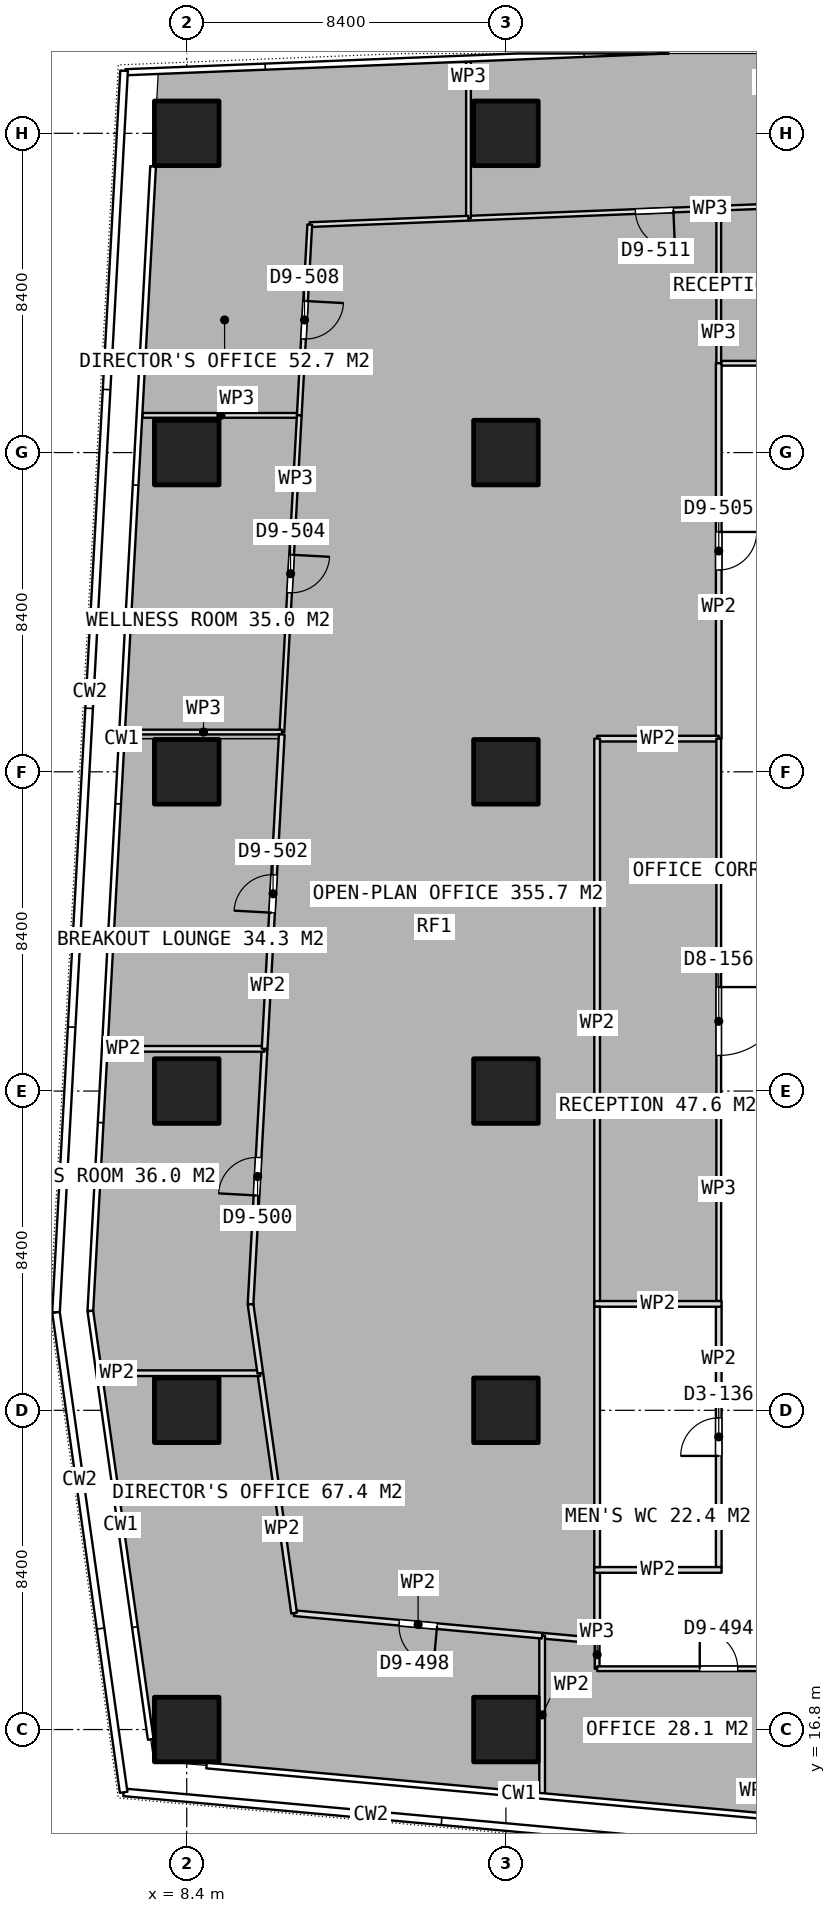
"""IFC4 building model, lengths in metres.
Left out: names, types, materials, properties, quantities, classifications, styles, units other than length and angle.
Written with IfcOpenShell. Run it as: python <this file> out.ifc"""

import sys

from ifc_helpers import new_model, si_unit, direction, frame, frame_2d, origin, origin_2d, place, context, subcontext, project, spatial, rectangle, extrude, element, fill, save


model = new_model("IFC4")
c1 = context("Model", 3, precision=1e-05, world=origin(), true_north=direction((0.0, 1.0)))
c2 = subcontext(c1, "Body", "Model", "MODEL_VIEW")
j1 = project(units=[si_unit("LENGTHUNIT", "METRE"), si_unit("PLANEANGLEUNIT", "RADIAN")], contexts=[c1])
p1 = place(None, origin())
s1 = spatial("IfcSite", under=j1, at=p1, CompositionType="ELEMENT")
p2 = place(p1, origin())
s2 = spatial("IfcBuilding", under=s1, at=p2, CompositionType="ELEMENT")
p3 = place(p2, frame((0.0, 0.0, 129.05)))
s3 = spatial("IfcBuildingStorey", under=s2, at=p3, CompositionType="ELEMENT", Elevation=129.05)
for number, where, z_axis, x_axis in (
    (1, (8.4, 16.8, 0.0), (0.0, 0.0, 1.0), (1.0, 0.0, 0.0)),
    (2, (8.4, 25.2, 0.0), (0.0, 0.0, 1.0), (1.0, 0.0, 0.0)),
    (3, (8.4, 33.6, 0.0), (0.0, 0.0, 1.0), (1.0, 0.0, 0.0)),
    (4, (8.4, 42.0, 0.0), (0.0, 0.0, 1.0), (1.0, 0.0, 0.0)),
    (5, (8.4, 50.4, 0.0), (0.0, 0.0, 1.0), (1.0, 0.0, 0.0)),
    (6, (8.4, 58.8, 0.0), (0.0, 0.0, 1.0), (1.0, 0.0, 0.0)),
    (7, (16.8, 16.8, 0.0), (0.0, 0.0, 1.0), (1.0, 0.0, 0.0)),
    (8, (16.8, 25.2, 0.0), (0.0, 0.0, 1.0), (1.0, 0.0, 0.0)),
    (9, (16.8, 33.6, 0.0), (0.0, 0.0, 1.0), (1.0, 0.0, 0.0)),
    (10, (16.8, 42.0, 0.0), (0.0, 0.0, 1.0), (1.0, 0.0, 0.0)),
    (11, (16.8, 50.4, 0.0), (0.0, 0.0, 1.0), (1.0, 0.0, 0.0)),
    (12, (16.8, 58.8, 0.0), (0.0, 0.0, 1.0), (1.0, 0.0, 0.0)),
):
    element("IfcColumn", number, at=place(p3, frame(where, z_axis=z_axis, x_axis=x_axis)), inside=s3, PredefinedType="COLUMN", context=c2, shape_type="SweptSolid", body=[
        extrude(rectangle(XDim=1.7, YDim=1.7, at=origin_2d()), origin(), (0.0, 0.0, 1.0), 3.75),
    ])
for number, where, z_axis, x_axis in (
    (13, (19.125, 21.0, 0.0), (0.0, 0.0, 1.0), (1.0, 0.0, 0.0)),
    (14, (19.125, 28.0, 0.0), (0.0, 0.0, 1.0), (1.0, 0.0, 0.0)),
):
    element("IfcWall", number, at=place(p3, frame(where, z_axis=z_axis, x_axis=x_axis)), inside=s3, PredefinedType="PARTITIONING", context=c2, shape_type="SweptSolid", body=[
        extrude(rectangle(XDim=3.35, YDim=0.15, at=frame_2d((1.675, 0.0))), origin(), (0.0, 0.0, 1.0), 3.5),
    ])
p4 = place(p3, frame((19.2, 21.075, 0.0), z_axis=(0.0, 0.0, 1.0), x_axis=(0.0, 1.0, 0.0)))
e15 = element("IfcWall", 15, at=p4, inside=s3, PredefinedType="PARTITIONING", context=c2, shape_type="SweptSolid", body=[
    extrude(rectangle(XDim=6.85, YDim=0.15, at=frame_2d((3.425, 0.0))), origin(), (0.0, 0.0, 1.0), 3.5),
])
p5 = place(p3, frame((22.4, 21.075, 0.0), z_axis=(0.0, 0.0, 1.0), x_axis=(0.0, 1.0, 0.0)))
e16 = element("IfcWall", 16, at=p5, inside=s3, PredefinedType="PARTITIONING", context=c2, shape_type="SweptSolid", body=[
    extrude(rectangle(XDim=6.85, YDim=0.15, at=frame_2d((3.425, 0.0))), origin(), (0.0, 0.0, 1.0), 3.5),
])
p6 = place(p5, frame((2.925, 0.0, 0.0)))
e17 = element("IfcOpeningElement", 17, at=p6, cuts=e16, PredefinedType="OPENING", context=c2, shape_type="SweptSolid", body=[
    extrude(rectangle(XDim=1.0, YDim=2.1, at=frame_2d((0.5, 1.05))), frame((0.0, 0.085, 0.0), z_axis=(0.0, -1.0, 0.0), x_axis=(1.0, 0.0, 0.0)), (0.0, 0.0, 1.0), 0.17),
])
p7 = place(p3, frame((25.599, 56.958, 0.0), z_axis=(0.0, 0.0, 1.0), x_axis=(-0.999198008703, -0.04004172078, 0.0)))
e18 = element("IfcWall", 18, at=p7, inside=s3, PredefinedType="PARTITIONING", context=c2, shape_type="SweptSolid", body=[
    extrude(rectangle(XDim=9.792, YDim=0.125, at=frame_2d((4.896, 0.0))), origin(), (0.0, 0.0, 1.0), 3.5),
])
p8 = place(p7, frame((4.396, 0.0, 0.0)))
e19 = element("IfcOpeningElement", 19, at=p8, cuts=e18, PredefinedType="OPENING", context=c2, shape_type="SweptSolid", body=[
    extrude(rectangle(XDim=1.0, YDim=2.1, at=frame_2d((0.5, 1.05))), frame((0.0, 0.073, 0.0), z_axis=(0.0, -1.0, 0.0), x_axis=(1.0, 0.0, 0.0)), (0.0, 0.0, 1.0), 0.145),
])
p9 = place(p3, frame((15.815, 56.566, 0.0), z_axis=(0.0, 0.0, 1.0), x_axis=(0.0, 1.0, 0.0)))
e20 = element("IfcWall", 20, at=p9, inside=s3, PredefinedType="PARTITIONING", context=c2, shape_type="SweptSolid", body=[
    extrude(rectangle(XDim=4.123, YDim=0.125, at=frame_2d((2.062, 0.0))), origin(), (0.0, 0.0, 1.0), 3.5),
])
p10 = place(p3, frame((11.362, 51.379, 0.0), z_axis=(0.0, 0.0, 1.0), x_axis=(-1.0, 0.0, 0.0)))
e21 = element("IfcWall", 21, at=p10, inside=s3, PredefinedType="PARTITIONING", context=c2, shape_type="SweptSolid", body=[
    extrude(rectangle(XDim=4.126, YDim=0.125, at=frame_2d((2.063, 0.0))), origin(), (0.0, 0.0, 1.0), 3.5),
])
p11 = place(p3, frame((15.814, 56.566, 0.0), z_axis=(0.0, 0.0, 1.0), x_axis=(-0.999192069217, -0.040189660545, 0.0)))
e22 = element("IfcWall", 22, at=p11, inside=s3, PredefinedType="PARTITIONING", context=c2, shape_type="SweptSolid", body=[
    extrude(rectangle(XDim=4.179, YDim=0.125, at=frame_2d((2.09, 0.0))), origin(), (0.0, 0.0, 1.0), 3.5),
])
p12 = place(p3, frame((11.638, 56.398, 0.0), z_axis=(0.0, 0.0, 1.0), x_axis=(-0.05488358881, -0.998492759953, 0.0)))
e23 = element("IfcWall", 23, at=p12, inside=s3, PredefinedType="PARTITIONING", context=c2, shape_type="SweptSolid", body=[
    extrude(rectangle(XDim=5.027, YDim=0.125, at=frame_2d((2.513, 0.0))), origin(), (0.0, 0.0, 1.0), 3.5),
])
p13 = place(p12, frame((2.013, 0.0, 0.0)))
e24 = element("IfcOpeningElement", 24, at=p13, cuts=e23, PredefinedType="OPENING", context=c2, shape_type="SweptSolid", body=[
    extrude(rectangle(XDim=1.0, YDim=2.1, at=frame_2d((0.5, 1.05))), frame((0.0, 0.073, 0.0), z_axis=(0.0, -1.0, 0.0), x_axis=(1.0, 0.0, 0.0)), (0.0, 0.0, 1.0), 0.145),
])
p14 = place(p3, frame((11.362, 51.378, 0.0), z_axis=(0.0, 0.0, 1.0), x_axis=(-0.054769987218, -0.998498997746, 0.0)))
e25 = element("IfcWall", 25, at=p14, inside=s3, PredefinedType="PARTITIONING", context=c2, shape_type="SweptSolid", body=[
    extrude(rectangle(XDim=8.344, YDim=0.125, at=frame_2d((4.172, 0.0))), origin(), (0.0, 0.0, 1.0), 3.5),
])
p15 = place(p14, frame((3.672, 0.0, 0.0)))
e26 = element("IfcOpeningElement", 26, at=p15, cuts=e25, PredefinedType="OPENING", context=c2, shape_type="SweptSolid", body=[
    extrude(rectangle(XDim=1.0, YDim=2.1, at=frame_2d((0.5, 1.05))), frame((0.0, 0.073, 0.0), z_axis=(0.0, -1.0, 0.0), x_axis=(1.0, 0.0, 0.0)), (0.0, 0.0, 1.0), 0.145),
])
p16 = place(p3, frame((10.905, 43.046, 0.0), z_axis=(0.0, 0.0, 1.0), x_axis=(-1.0, 0.0, 0.0)))
e27 = element("IfcWall", 27, at=p16, inside=s3, PredefinedType="PARTITIONING", context=c2, shape_type="SweptSolid", body=[
    extrude(rectangle(XDim=4.126, YDim=0.125, at=frame_2d((2.063, 0.0))), origin(), (0.0, 0.0, 1.0), 3.5),
])
p17 = place(p3, frame((29.6, 52.75, 0.0), z_axis=(0.0, 0.0, 1.0), x_axis=(-1.0, 0.0, 0.0)))
e28 = element("IfcWall", 28, at=p17, inside=s3, PredefinedType="PARTITIONING", context=c2, shape_type="SweptSolid", body=[
    extrude(rectangle(XDim=7.2, YDim=0.125, at=frame_2d((3.6, 0.0))), origin(), (0.0, 0.0, 1.0), 3.5),
])
p18 = place(p17, frame((3.1, 0.0, 0.0)))
e29 = element("IfcOpeningElement", 29, at=p18, cuts=e28, PredefinedType="OPENING", context=c2, shape_type="SweptSolid", body=[
    extrude(rectangle(XDim=1.0, YDim=2.1, at=frame_2d((0.5, 1.05))), frame((0.0, 0.073, 0.0), z_axis=(0.0, -1.0, 0.0), x_axis=(1.0, 0.0, 0.0)), (0.0, 0.0, 1.0), 0.145),
])
p19 = place(p3, frame((22.4, 52.75, 0.0), z_axis=(0.0, 0.0, 1.0), x_axis=(0.0, 1.0, 0.0)))
e30 = element("IfcWall", 30, at=p19, inside=s3, PredefinedType="PARTITIONING", context=c2, shape_type="SweptSolid", body=[
    extrude(rectangle(XDim=4.017, YDim=0.125, at=frame_2d((2.009, 0.0))), origin(), (0.0, 0.0, 1.0), 3.5),
])
p20 = place(p3, frame((22.4, 52.75, 0.0), z_axis=(0.0, 0.0, 1.0), x_axis=(0.0, -1.0, 0.0)))
e31 = element("IfcWall", 31, at=p20, inside=s3, PredefinedType="PARTITIONING", context=c2, shape_type="SweptSolid", body=[
    extrude(rectangle(XDim=9.877, YDim=0.15, at=frame_2d((4.938, 0.0))), origin(), (0.0, 0.0, 1.0), 3.5),
])
p21 = place(p20, frame((4.439, 0.0, 0.0)))
e32 = element("IfcOpeningElement", 32, at=p21, cuts=e31, PredefinedType="OPENING", context=c2, shape_type="SweptSolid", body=[
    extrude(rectangle(XDim=1.0, YDim=2.1, at=frame_2d((0.5, 1.05))), frame((0.0, 0.085, 0.0), z_axis=(0.0, -1.0, 0.0), x_axis=(1.0, 0.0, 0.0)), (0.0, 0.0, 1.0), 0.17),
])
p22 = place(p3, frame((22.4, 42.873, 0.0), z_axis=(0.0, 0.0, 1.0), x_axis=(-1.0, 0.0, 0.0)))
e33 = element("IfcWall", 33, at=p22, inside=s3, PredefinedType="PARTITIONING", context=c2, shape_type="SweptSolid", body=[
    extrude(rectangle(XDim=3.2, YDim=0.15, at=frame_2d((1.6, 0.0))), origin(), (0.0, 0.0, 1.0), 3.5),
])
p23 = place(p3, frame((19.2, 42.873, 0.0), z_axis=(0.0, 0.0, 1.0), x_axis=(0.0, -1.0, 0.0)))
e34 = element("IfcWall", 34, at=p23, inside=s3, PredefinedType="PARTITIONING", context=c2, shape_type="SweptSolid", body=[
    extrude(rectangle(XDim=14.948, YDim=0.15, at=frame_2d((7.474, 0.0))), origin(), (0.0, 0.0, 1.0), 3.5),
])
p24 = place(p3, frame((19.2, 21.075, 0.0), z_axis=(0.0, 0.0, 1.0), x_axis=(0.0, -1.0, 0.0)))
e35 = element("IfcWall", 35, at=p24, inside=s3, PredefinedType="PARTITIONING", context=c2, shape_type="SweptSolid", body=[
    extrude(rectangle(XDim=1.937, YDim=0.15, at=frame_2d((0.969, 0.0))), origin(), (0.0, 0.0, 1.0), 3.5),
])
p25 = place(p3, frame((19.2, 19.138, 0.0), z_axis=(0.0, 0.0, 1.0), x_axis=(-0.995920706464, 0.090232734836, 0.0)))
e36 = element("IfcWall", 36, at=p25, inside=s3, PredefinedType="PARTITIONING", context=c2, shape_type="SweptSolid", body=[
    extrude(rectangle(XDim=1.453, YDim=0.15, at=frame_2d((0.727, 0.0))), origin(), (0.0, 0.0, 1.0), 3.5),
])
p26 = place(p3, frame((17.753, 19.269, 0.0), z_axis=(0.0, 0.0, 1.0), x_axis=(0.0, -1.0, 0.0)))
e37 = element("IfcWall", 37, at=p26, inside=s3, PredefinedType="PARTITIONING", context=c2, shape_type="SweptSolid", body=[
    extrude(rectangle(XDim=4.167, YDim=0.15, at=frame_2d((2.083, 0.0))), origin(), (0.0, 0.0, 1.0), 3.5),
])
p27 = place(p3, frame((17.752, 19.269, 0.0), z_axis=(0.0, 0.0, 1.0), x_axis=(-0.995896565077, 0.090498793736, 0.0)))
e38 = element("IfcWall", 38, at=p27, inside=s3, PredefinedType="PARTITIONING", context=c2, shape_type="SweptSolid", body=[
    extrude(rectangle(XDim=6.553, YDim=0.15, at=frame_2d((3.276, 0.0))), origin(), (0.0, 0.0, 1.0), 3.5),
])
p28 = place(p27, frame((2.776, 0.0, 0.0)))
e39 = element("IfcOpeningElement", 39, at=p28, cuts=e38, PredefinedType="OPENING", context=c2, shape_type="SweptSolid", body=[
    extrude(rectangle(XDim=1.0, YDim=2.1, at=frame_2d((0.5, 1.05))), frame((0.0, 0.085, 0.0), z_axis=(0.0, -1.0, 0.0), x_axis=(1.0, 0.0, 0.0)), (0.0, 0.0, 1.0), 0.17),
])
p29 = place(p3, frame((11.226, 19.862, 0.0), z_axis=(0.0, 0.0, 1.0), x_axis=(-0.13959860056, 0.990208175447, 0.0)))
e40 = element("IfcWall", 40, at=p29, inside=s3, PredefinedType="PARTITIONING", context=c2, shape_type="SweptSolid", body=[
    extrude(rectangle(XDim=6.376, YDim=0.15, at=frame_2d((3.188, 0.0))), origin(), (0.0, 0.0, 1.0), 3.5),
])
p30 = place(p3, frame((10.336, 26.176, 0.0), z_axis=(0.0, 0.0, 1.0), x_axis=(-1.0, 0.0, 0.0)))
e41 = element("IfcWall", 41, at=p30, inside=s3, PredefinedType="PARTITIONING", context=c2, shape_type="SweptSolid", body=[
    extrude(rectangle(XDim=4.191, YDim=0.15, at=frame_2d((2.095, 0.0))), origin(), (0.0, 0.0, 1.0), 3.5),
])
p31 = place(p3, frame((10.336, 26.177, 0.0), z_axis=(0.0, 0.0, 1.0), x_axis=(-0.139520002301, 0.990219252973, 0.0)))
e42 = element("IfcWall", 42, at=p31, inside=s3, PredefinedType="PARTITIONING", context=c2, shape_type="SweptSolid", body=[
    extrude(rectangle(XDim=1.834, YDim=0.15, at=frame_2d((0.917, 0.0))), origin(), (0.0, 0.0, 1.0), 3.5),
])
p32 = place(p3, frame((10.08, 27.993, 0.0), z_axis=(0.0, 0.0, 1.0), x_axis=(0.054828909379, 0.998495763985, 0.0)))
e43 = element("IfcWall", 43, at=p32, inside=s3, PredefinedType="PARTITIONING", context=c2, shape_type="SweptSolid", body=[
    extrude(rectangle(XDim=6.728, YDim=0.15, at=frame_2d((3.364, 0.0))), origin(), (0.0, 0.0, 1.0), 3.5),
])
p33 = place(p32, frame((2.864, 0.0, 0.0)))
e44 = element("IfcOpeningElement", 44, at=p33, cuts=e43, PredefinedType="OPENING", context=c2, shape_type="SweptSolid", body=[
    extrude(rectangle(XDim=1.0, YDim=2.1, at=frame_2d((0.5, 1.05))), frame((0.0, 0.085, 0.0), z_axis=(0.0, -1.0, 0.0), x_axis=(1.0, 0.0, 0.0)), (0.0, 0.0, 1.0), 0.17),
])
p34 = place(p3, frame((10.449, 34.711, 0.0), z_axis=(0.0, 0.0, 1.0), x_axis=(-1.0, 0.0, 0.0)))
e45 = element("IfcWall", 45, at=p34, inside=s3, PredefinedType="PARTITIONING", context=c2, shape_type="SweptSolid", body=[
    extrude(rectangle(XDim=4.127, YDim=0.15, at=frame_2d((2.063, 0.0))), origin(), (0.0, 0.0, 1.0), 3.5),
])
p35 = place(p3, frame((10.449, 34.712, 0.0), z_axis=(0.0, 0.0, 1.0), x_axis=(0.054702785793, 0.998502681632, 0.0)))
e46 = element("IfcWall", 46, at=p35, inside=s3, PredefinedType="PARTITIONING", context=c2, shape_type="SweptSolid", body=[
    extrude(rectangle(XDim=8.283, YDim=0.15, at=frame_2d((4.142, 0.0))), origin(), (0.0, 0.0, 1.0), 3.5),
])
p36 = place(p35, frame((3.586, 0.0, 0.0)))
e47 = element("IfcOpeningElement", 47, at=p36, cuts=e46, PredefinedType="OPENING", context=c2, shape_type="SweptSolid", body=[
    extrude(rectangle(XDim=1.0, YDim=2.1, at=frame_2d((0.5, 1.05))), frame((0.0, 0.085, 0.0), z_axis=(0.0, -1.0, 0.0), x_axis=(1.0, 0.0, 0.0)), (0.0, 0.0, 1.0), 0.17),
])
p37 = place(p3, frame((19.2, 19.138, 0.0), z_axis=(0.0, 0.0, 1.0), x_axis=(0.0, -1.0, 0.0)))
e48 = element("IfcWall", 48, at=p37, inside=s3, PredefinedType="PARTITIONING", context=c2, shape_type="SweptSolid", body=[
    extrude(rectangle(XDim=0.738, YDim=0.125, at=frame_2d((0.369, 0.0))), origin(), (0.0, 0.0, 1.0), 3.5),
])
p38 = place(p3, frame((19.2, 18.4, 0.0), z_axis=(0.0, 0.0, 1.0), x_axis=(1.0, 0.0, 0.0)))
e49 = element("IfcWall", 49, at=p38, inside=s3, PredefinedType="PARTITIONING", context=c2, shape_type="SweptSolid", body=[
    extrude(rectangle(XDim=6.4, YDim=0.125, at=frame_2d((3.2, 0.0))), origin(), (0.0, 0.0, 1.0), 3.5),
])
p39 = place(p38, frame((2.7, 0.0, 0.0)))
e50 = element("IfcOpeningElement", 50, at=p39, cuts=e49, PredefinedType="OPENING", context=c2, shape_type="SweptSolid", body=[
    extrude(rectangle(XDim=1.0, YDim=2.1, at=frame_2d((0.5, 1.05))), frame((0.0, 0.073, 0.0), z_axis=(0.0, -1.0, 0.0), x_axis=(1.0, 0.0, 0.0)), (0.0, 0.0, 1.0), 0.145),
])
p40 = place(p3, frame((22.4, 42.872, 0.0), z_axis=(0.0, 0.0, 1.0), x_axis=(0.0, -1.0, 0.0)))
e51 = element("IfcWall", 51, at=p40, inside=s3, PredefinedType="PARTITIONING", context=c2, shape_type="SweptSolid", body=[
    extrude(rectangle(XDim=14.797, YDim=0.125, at=frame_2d((7.398, 0.0))), origin(), (0.0, 0.0, 1.0), 3.5),
])
p41 = place(p40, frame((6.536, 0.0, 0.0)))
e52 = element("IfcOpeningElement", 52, at=p41, cuts=e51, PredefinedType="OPENING", context=c2, shape_type="SweptSolid", body=[
    extrude(rectangle(XDim=1.8, YDim=2.1, at=frame_2d((0.9, 1.05))), frame((0.0, 0.073, 0.0), z_axis=(0.0, -1.0, 0.0), x_axis=(1.0, 0.0, 0.0)), (0.0, 0.0, 1.0), 0.145),
])
p42 = place(p6, origin())
e53 = element("IfcDoor", 53, at=p42, inside=s3, OperationType="SINGLE_SWING_LEFT", PredefinedType="DOOR", context=c2, shape_type="SweptSolid", body=[
    extrude(rectangle(XDim=1.0, YDim=2.1, at=frame_2d((0.5, 1.05))), frame((0.0, 0.025, 0.0), z_axis=(0.0, -1.0, 0.0), x_axis=(1.0, 0.0, 0.0)), (0.0, 0.0, 1.0), 0.05),
])
fill(e17, e53)
p43 = place(p8, origin())
e54 = element("IfcDoor", 54, at=p43, inside=s3, OperationType="SINGLE_SWING_LEFT", PredefinedType="DOOR", context=c2, shape_type="SweptSolid", body=[
    extrude(rectangle(XDim=1.0, YDim=2.1, at=frame_2d((0.5, 1.05))), frame((0.0, 0.025, 0.0), z_axis=(0.0, -1.0, 0.0), x_axis=(1.0, 0.0, 0.0)), (0.0, 0.0, 1.0), 0.05),
])
fill(e19, e54)
p44 = place(p13, origin())
e55 = element("IfcDoor", 55, at=p44, inside=s3, OperationType="SINGLE_SWING_LEFT", PredefinedType="DOOR", context=c2, shape_type="SweptSolid", body=[
    extrude(rectangle(XDim=1.0, YDim=2.1, at=frame_2d((0.5, 1.05))), frame((0.0, 0.025, 0.0), z_axis=(0.0, -1.0, 0.0), x_axis=(1.0, 0.0, 0.0)), (0.0, 0.0, 1.0), 0.05),
])
fill(e24, e55)
p45 = place(p15, origin())
e56 = element("IfcDoor", 56, at=p45, inside=s3, OperationType="SINGLE_SWING_LEFT", PredefinedType="DOOR", context=c2, shape_type="SweptSolid", body=[
    extrude(rectangle(XDim=1.0, YDim=2.1, at=frame_2d((0.5, 1.05))), frame((0.0, 0.025, 0.0), z_axis=(0.0, -1.0, 0.0), x_axis=(1.0, 0.0, 0.0)), (0.0, 0.0, 1.0), 0.05),
])
fill(e26, e56)
p46 = place(p21, origin())
e57 = element("IfcDoor", 57, at=p46, inside=s3, OperationType="SINGLE_SWING_LEFT", PredefinedType="DOOR", context=c2, shape_type="SweptSolid", body=[
    extrude(rectangle(XDim=1.0, YDim=2.1, at=frame_2d((0.5, 1.05))), frame((0.0, 0.025, 0.0), z_axis=(0.0, -1.0, 0.0), x_axis=(1.0, 0.0, 0.0)), (0.0, 0.0, 1.0), 0.05),
])
fill(e32, e57)
p47 = place(p36, origin())
e58 = element("IfcDoor", 58, at=p47, inside=s3, OperationType="SINGLE_SWING_LEFT", PredefinedType="DOOR", context=c2, shape_type="SweptSolid", body=[
    extrude(rectangle(XDim=1.0, YDim=2.1, at=frame_2d((0.5, 1.05))), frame((0.0, 0.025, 0.0), z_axis=(0.0, -1.0, 0.0), x_axis=(1.0, 0.0, 0.0)), (0.0, 0.0, 1.0), 0.05),
])
fill(e47, e58)
p48 = place(p33, origin())
e59 = element("IfcDoor", 59, at=p48, inside=s3, OperationType="SINGLE_SWING_LEFT", PredefinedType="DOOR", context=c2, shape_type="SweptSolid", body=[
    extrude(rectangle(XDim=1.0, YDim=2.1, at=frame_2d((0.5, 1.05))), frame((0.0, 0.025, 0.0), z_axis=(0.0, -1.0, 0.0), x_axis=(1.0, 0.0, 0.0)), (0.0, 0.0, 1.0), 0.05),
])
fill(e44, e59)
p49 = place(p28, origin())
e60 = element("IfcDoor", 60, at=p49, inside=s3, OperationType="SINGLE_SWING_LEFT", PredefinedType="DOOR", context=c2, shape_type="SweptSolid", body=[
    extrude(rectangle(XDim=1.0, YDim=2.1, at=frame_2d((0.5, 1.05))), frame((0.0, 0.025, 0.0), z_axis=(0.0, -1.0, 0.0), x_axis=(1.0, 0.0, 0.0)), (0.0, 0.0, 1.0), 0.05),
])
fill(e39, e60)
p50 = place(p39, origin())
e61 = element("IfcDoor", 61, at=p50, inside=s3, OperationType="SINGLE_SWING_LEFT", PredefinedType="DOOR", context=c2, shape_type="SweptSolid", body=[
    extrude(rectangle(XDim=1.0, YDim=2.1, at=frame_2d((0.5, 1.05))), frame((0.0, 0.025, 0.0), z_axis=(0.0, -1.0, 0.0), x_axis=(1.0, 0.0, 0.0)), (0.0, 0.0, 1.0), 0.05),
])
fill(e50, e61)
p51 = place(p41, origin())
e62 = element("IfcDoor", 62, at=p51, inside=s3, OperationType="DOUBLE_DOOR_SINGLE_SWING", PredefinedType="DOOR", context=c2, shape_type="SweptSolid", body=[
    extrude(rectangle(XDim=1.8, YDim=2.1, at=frame_2d((0.9, 1.05))), frame((0.0, 0.025, 0.0), z_axis=(0.0, -1.0, 0.0), x_axis=(1.0, 0.0, 0.0)), (0.0, 0.0, 1.0), 0.05),
])
fill(e52, e62)
save(model, sys.argv[1])
